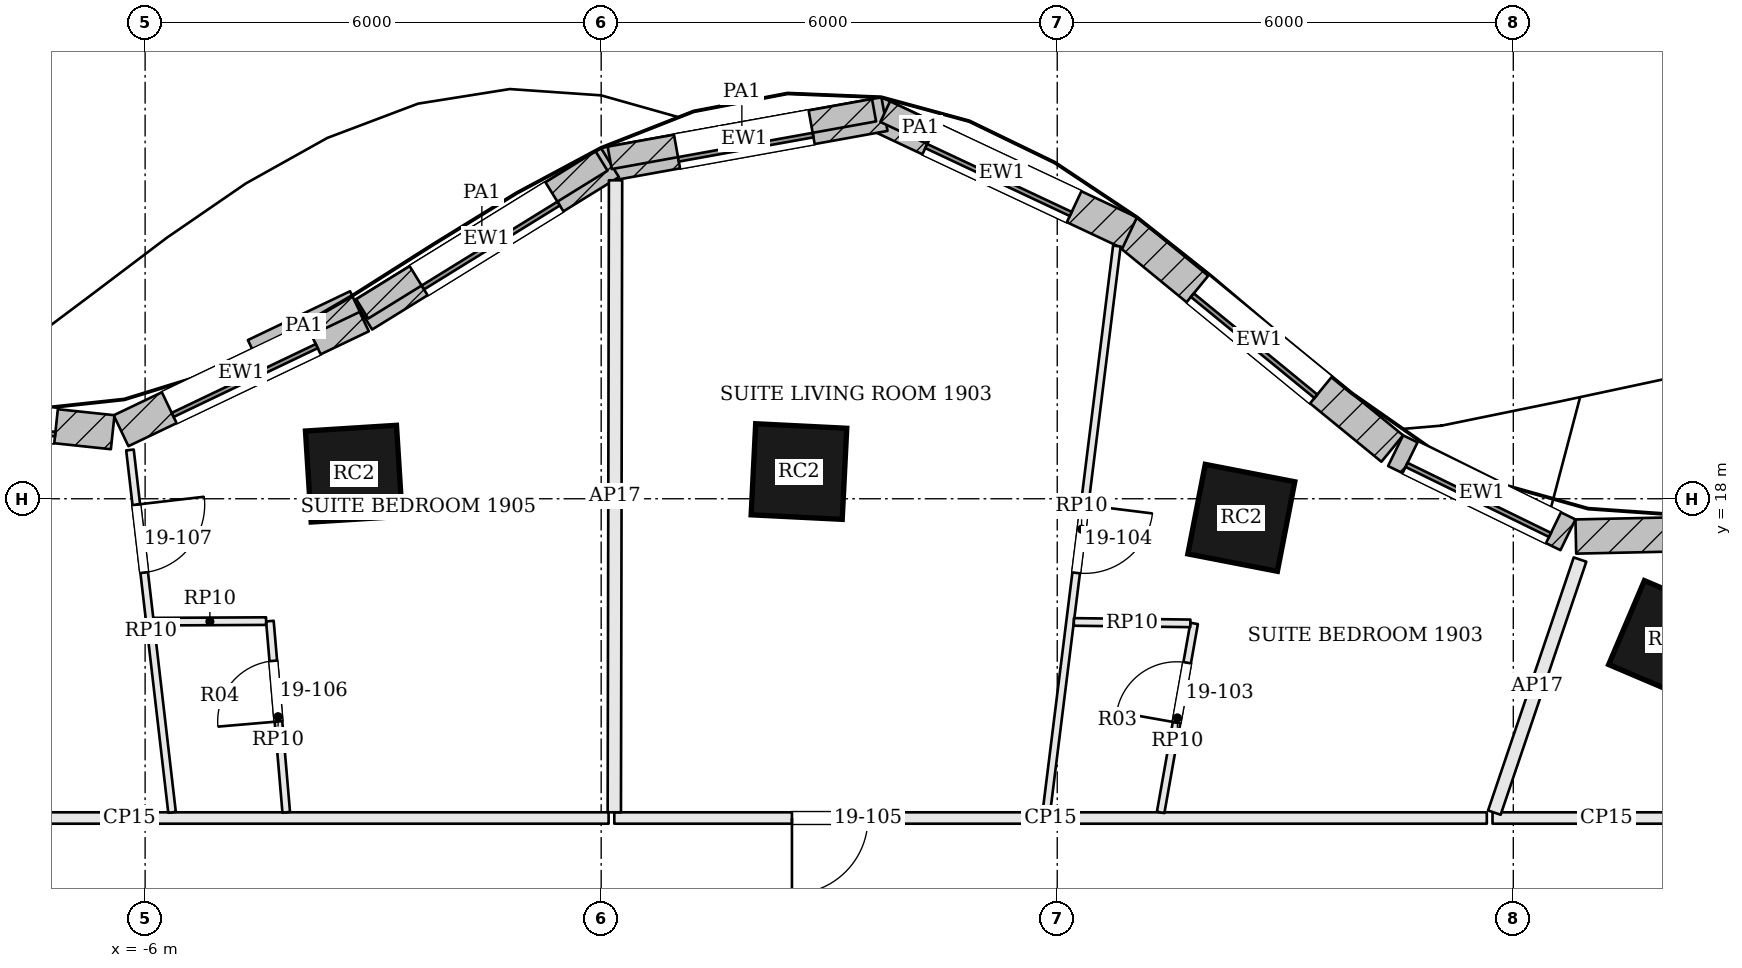
"""IFC4 building model, lengths in metres.
Left out: names, types, materials, properties, quantities, classifications, styles, units other than length and angle.
Written with IfcOpenShell. Run it as: python <this file> out.ifc"""

import sys

from ifc_helpers import new_model, si_unit, direction, frame, frame_2d, origin, origin_2d, place, context, subcontext, project, spatial, rectangle, extrude, element, fill, save


model = new_model("IFC4")
c1 = context("Model", 3, precision=1e-05, world=origin(), true_north=direction((0.0, 1.0)))
c2 = subcontext(c1, "Body", "Model", "MODEL_VIEW")
j1 = project(units=[si_unit("LENGTHUNIT", "METRE"), si_unit("PLANEANGLEUNIT", "RADIAN")], contexts=[c1])
p1 = place(None, origin())
s1 = spatial("IfcSite", under=j1, at=p1, CompositionType="ELEMENT")
p2 = place(p1, origin())
s2 = spatial("IfcBuilding", under=s1, at=p2, CompositionType="ELEMENT")
p3 = place(p2, frame((0.0, 0.0, 85.2)))
s3 = spatial("IfcBuildingStorey", under=s2, at=p3, CompositionType="ELEMENT", Elevation=85.2)
for number, where, z_axis, x_axis in (
    (1, (14.042, 16.136, 0.0), (0.0, 0.0, 1.0), (-0.92, 0.392, 0.0)),
    (2, (8.422, 17.749, 0.0), (0.0, 0.0, 1.0), (-0.982, 0.191, 0.0)),
    (3, (2.602, 18.358, 0.0), (0.0, 0.0, 1.0), (-0.999, 0.05, 0.0)),
    (4, (-3.254, 18.33, 0.0), (0.0, 0.0, 1.0), (-0.998, -0.063, 0.0)),
):
    element("IfcColumn", number, at=place(p3, frame(where, z_axis=z_axis, x_axis=x_axis)), inside=s3, PredefinedType="COLUMN", context=c2, shape_type="SweptSolid", body=[
        extrude(rectangle(XDim=1.2, YDim=1.2, at=origin_2d()), origin(), (0.0, 0.0, 1.0), 3.6),
    ])
p4 = place(p3, frame((18.434, 17.622, 0.0), z_axis=(0.0, 0.0, 1.0), x_axis=(-0.999773749739, -0.021270856405, 0.0)))
e5 = element("IfcWall", 5, at=p4, inside=s3, PredefinedType="SOLIDWALL", context=c2, shape_type="SweptSolid", body=[
    extrude(rectangle(XDim=5.613, YDim=0.45, at=frame_2d((2.806, 0.0))), origin(), (0.0, 0.0, 1.0), 3.4),
])
p5 = place(p4, frame((1.756, 0.0, 0.9)))
e6 = element("IfcOpeningElement", 6, at=p5, cuts=e5, PredefinedType="OPENING", context=c2, shape_type="SweptSolid", body=[
    extrude(rectangle(XDim=2.1, YDim=2.0, at=frame_2d((1.05, 1.0))), frame((0.0, 0.235, 0.0), z_axis=(0.0, -1.0, 0.0), x_axis=(1.0, 0.0, 0.0)), (0.0, 0.0, 1.0), 0.47),
])
p6 = place(p3, frame((12.719, 17.526, 0.0), z_axis=(0.0, 0.0, 1.0), x_axis=(-0.898643806462, 0.438679050226, 0.0)))
e7 = element("IfcWall", 7, at=p6, inside=s3, PredefinedType="SOLIDWALL", context=c2, shape_type="SweptSolid", body=[
    extrude(rectangle(XDim=2.523, YDim=0.45, at=frame_2d((1.262, 0.0))), origin(), (0.0, 0.0, 1.0), 3.4),
])
p7 = place(p6, frame((0.212, 0.0, 0.9)))
e8 = element("IfcOpeningElement", 8, at=p7, cuts=e7, PredefinedType="OPENING", context=c2, shape_type="SweptSolid", body=[
    extrude(rectangle(XDim=2.1, YDim=2.0, at=frame_2d((1.05, 1.0))), frame((0.0, 0.235, 0.0), z_axis=(0.0, -1.0, 0.0), x_axis=(1.0, 0.0, 0.0)), (0.0, 0.0, 1.0), 0.47),
])
p8 = place(p3, frame((10.407, 18.661, 0.0), z_axis=(0.0, 0.0, 1.0), x_axis=(-0.773702458947, 0.633549133864, 0.0)))
e9 = element("IfcWall", 9, at=p8, inside=s3, PredefinedType="SOLIDWALL", context=c2, shape_type="SweptSolid", body=[
    extrude(rectangle(XDim=4.526, YDim=0.45, at=frame_2d((2.263, 0.0))), origin(), (0.0, 0.0, 1.0), 3.4),
])
p9 = place(p8, frame((1.213, 0.0, 0.9)))
e10 = element("IfcOpeningElement", 10, at=p9, cuts=e9, PredefinedType="OPENING", context=c2, shape_type="SweptSolid", body=[
    extrude(rectangle(XDim=2.1, YDim=2.0, at=frame_2d((1.05, 1.0))), frame((0.0, 0.235, 0.0), z_axis=(0.0, -1.0, 0.0), x_axis=(1.0, 0.0, 0.0)), (0.0, 0.0, 1.0), 0.47),
])
p10 = place(p3, frame((6.953, 21.499, 0.0), z_axis=(0.0, 0.0, 1.0), x_axis=(-0.905034581957, 0.425337989676, 0.0)))
e11 = element("IfcWall", 11, at=p10, inside=s3, PredefinedType="SOLIDWALL", context=c2, shape_type="SweptSolid", body=[
    extrude(rectangle(XDim=3.714, YDim=0.45, at=frame_2d((1.857, 0.0))), origin(), (0.0, 0.0, 1.0), 3.4),
])
p11 = place(p10, frame((0.807, 0.0, 0.9)))
e12 = element("IfcOpeningElement", 12, at=p11, cuts=e11, PredefinedType="OPENING", context=c2, shape_type="SweptSolid", body=[
    extrude(rectangle(XDim=2.1, YDim=2.0, at=frame_2d((1.05, 1.0))), frame((0.0, 0.235, 0.0), z_axis=(0.0, -1.0, 0.0), x_axis=(1.0, 0.0, 0.0)), (0.0, 0.0, 1.0), 0.47),
])
p12 = place(p3, frame((3.727, 23.061, 0.0), z_axis=(0.0, 0.0, 1.0), x_axis=(-0.984119180424, -0.177508982087, 0.0)))
e13 = element("IfcWall", 13, at=p12, inside=s3, PredefinedType="SOLIDWALL", context=c2, shape_type="SweptSolid", body=[
    extrude(rectangle(XDim=3.747, YDim=0.45, at=frame_2d((1.873, 0.0))), origin(), (0.0, 0.0, 1.0), 3.4),
])
p13 = place(p12, frame((0.973, 0.0, 0.9)))
e14 = element("IfcOpeningElement", 14, at=p13, cuts=e13, PredefinedType="OPENING", context=c2, shape_type="SweptSolid", body=[
    extrude(rectangle(XDim=1.8, YDim=2.0, at=frame_2d((0.9, 1.0))), frame((0.0, 0.235, 0.0), z_axis=(0.0, -1.0, 0.0), x_axis=(1.0, 0.0, 0.0)), (0.0, 0.0, 1.0), 0.47),
])
p14 = place(p3, frame((0.115, 22.424, 0.0), z_axis=(0.0, 0.0, 1.0), x_axis=(-0.8506970368, -0.525656305564, 0.0)))
e15 = element("IfcWall", 15, at=p14, inside=s3, PredefinedType="SOLIDWALL", context=c2, shape_type="SweptSolid", body=[
    extrude(rectangle(XDim=3.816, YDim=0.45, at=frame_2d((1.908, 0.0))), origin(), (0.0, 0.0, 1.0), 3.4),
])
p15 = place(p14, frame((0.858, 0.0, 0.9)))
e16 = element("IfcOpeningElement", 16, at=p15, cuts=e15, PredefinedType="OPENING", context=c2, shape_type="SweptSolid", body=[
    extrude(rectangle(XDim=2.1, YDim=2.0, at=frame_2d((1.05, 1.0))), frame((0.0, 0.235, 0.0), z_axis=(0.0, -1.0, 0.0), x_axis=(1.0, 0.0, 0.0)), (0.0, 0.0, 1.0), 0.47),
])
p16 = place(p3, frame((-3.154, 20.406, 0.0), z_axis=(0.0, 0.0, 1.0), x_axis=(-0.902333313, -0.431038968367, 0.0)))
e17 = element("IfcWall", 17, at=p16, inside=s3, PredefinedType="SOLIDWALL", context=c2, shape_type="SweptSolid", body=[
    extrude(rectangle(XDim=3.505, YDim=0.45, at=frame_2d((1.753, 0.0))), origin(), (0.0, 0.0, 1.0), 3.4),
])
p17 = place(p16, frame((0.703, 0.0, 0.9)))
e18 = element("IfcOpeningElement", 18, at=p17, cuts=e17, PredefinedType="OPENING", context=c2, shape_type="SweptSolid", body=[
    extrude(rectangle(XDim=2.1, YDim=2.0, at=frame_2d((1.05, 1.0))), frame((0.0, 0.235, 0.0), z_axis=(0.0, -1.0, 0.0), x_axis=(1.0, 0.0, 0.0)), (0.0, 0.0, 1.0), 0.47),
])
p18 = place(p3, frame((-6.427, 18.875, 0.0), z_axis=(0.0, 0.0, 1.0), x_axis=(-0.994433468803, 0.10536638992, 0.0)))
e19 = element("IfcWall", 19, at=p18, inside=s3, PredefinedType="SOLIDWALL", context=c2, shape_type="SweptSolid", body=[
    extrude(rectangle(XDim=3.598, YDim=0.45, at=frame_2d((1.799, 0.0))), origin(), (0.0, 0.0, 1.0), 3.4),
])
p19 = place(p18, frame((0.749, 0.0, 0.9)))
e20 = element("IfcOpeningElement", 20, at=p19, cuts=e19, PredefinedType="OPENING", context=c2, shape_type="SweptSolid", body=[
    extrude(rectangle(XDim=2.1, YDim=2.0, at=frame_2d((1.05, 1.0))), frame((0.0, 0.235, 0.0), z_axis=(0.0, -1.0, 0.0), x_axis=(1.0, 0.0, 0.0)), (0.0, 0.0, 1.0), 0.47),
])
p20 = place(p3, frame((4.667, 22.656, 3.6), z_axis=(0.0, 0.0, 1.0), x_axis=(-0.905050240273, 0.425304670304, 0.0)))
e21 = element("IfcWall", 21, at=p20, inside=s3, PredefinedType="PARAPET", context=c2, shape_type="SweptSolid", body=[
    extrude(rectangle(XDim=1.027, YDim=0.3, at=frame_2d((0.513, 0.0))), origin(), (0.0, 0.0, 1.0), 1.1),
])
p21 = place(p3, frame((3.59, 23.112, 3.6), z_axis=(0.0, 0.0, 1.0), x_axis=(-0.984124248147, -0.177480884064, 0.0)))
e22 = element("IfcWall", 22, at=p21, inside=s3, PredefinedType="PARAPET", context=c2, shape_type="SweptSolid", body=[
    extrude(rectangle(XDim=3.534, YDim=0.3, at=frame_2d((1.767, 0.0))), origin(), (0.0, 0.0, 1.0), 1.1),
])
p22 = place(p3, frame((0.005, 22.444, 3.6), z_axis=(0.0, 0.0, 1.0), x_axis=(-0.850710394144, -0.525634688063, 0.0)))
e23 = element("IfcWall", 23, at=p22, inside=s3, PredefinedType="PARAPET", context=c2, shape_type="SweptSolid", body=[
    extrude(rectangle(XDim=3.702, YDim=0.3, at=frame_2d((1.851, 0.0))), origin(), (0.0, 0.0, 1.0), 1.1),
])
p23 = place(p3, frame((-3.239, 20.594, 3.6), z_axis=(0.0, 0.0, 1.0), x_axis=(-0.902344893923, -0.431014724123, 0.0)))
e24 = element("IfcWall", 24, at=p23, inside=s3, PredefinedType="PARAPET", context=c2, shape_type="SweptSolid", body=[
    extrude(rectangle(XDim=1.49, YDim=0.3, at=frame_2d((0.745, 0.0))), origin(), (0.0, 0.0, 1.0), 1.1),
])
p24 = place(p3, frame((14.725, 13.8, 0.0), z_axis=(0.0, 0.0, 1.0), x_axis=(-1.0, 0.0, 0.0)))
e25 = element("IfcWall", 25, at=p24, inside=s3, PredefinedType="PARTITIONING", context=c2, shape_type="SweptSolid", body=[
    extrude(rectangle(XDim=2.998, YDim=0.15, at=frame_2d((1.499, 0.0))), origin(), (0.0, 0.0, 1.0), 2.784),
])
p25 = place(p3, frame((12.878, 17.2, 0.0), z_axis=(0.0, 0.0, 1.0), x_axis=(-0.320642197559, -0.947200391229, 0.0)))
e26 = element("IfcWall", 26, at=p25, inside=s3, PredefinedType="PARTITIONING", context=c2, shape_type="SweptSolid", body=[
    extrude(rectangle(XDim=3.515, YDim=0.175, at=frame_2d((1.757, 0.0))), origin(), (0.0, 0.0, 1.0), 2.784),
])
p26 = place(p3, frame((11.652, 13.8, 0.0), z_axis=(0.0, 0.0, 1.0), x_axis=(-1.0, 0.0, 0.0)))
e27 = element("IfcWall", 27, at=p26, inside=s3, PredefinedType="PARTITIONING", context=c2, shape_type="SweptSolid", body=[
    extrude(rectangle(XDim=11.479, YDim=0.15, at=frame_2d((5.74, 0.0))), origin(), (0.0, 0.0, 1.0), 2.784),
])
p27 = place(p26, frame((8.142, 0.0, 0.0)))
e28 = element("IfcOpeningElement", 28, at=p27, cuts=e27, PredefinedType="OPENING", context=c2, shape_type="SweptSolid", body=[
    extrude(rectangle(XDim=1.0, YDim=2.1, at=frame_2d((0.5, 1.05))), frame((0.0, 0.085, 0.0), z_axis=(0.0, -1.0, 0.0), x_axis=(1.0, 0.0, 0.0)), (0.0, 0.0, 1.0), 0.17),
])
p28 = place(p3, frame((0.189, 22.19, 0.0), z_axis=(0.0, 0.0, 1.0), x_axis=(-0.001967286324, -0.99999806489, 0.0)))
e29 = element("IfcWall", 29, at=p28, inside=s3, PredefinedType="PARTITIONING", context=c2, shape_type="SweptSolid", body=[
    extrude(rectangle(XDim=8.315, YDim=0.175, at=frame_2d((4.157, 0.0))), origin(), (0.0, 0.0, 1.0), 2.784),
])
p29 = place(p3, frame((0.098, 13.8, 0.0), z_axis=(0.0, 0.0, 1.0), x_axis=(-1.0, 0.0, 0.0)))
e30 = element("IfcWall", 30, at=p29, inside=s3, PredefinedType="PARTITIONING", context=c2, shape_type="SweptSolid", body=[
    extrude(rectangle(XDim=12.609, YDim=0.15, at=frame_2d((6.304, 0.0))), origin(), (0.0, 0.0, 1.0), 2.784),
])
p30 = place(p29, frame((8.672, 0.0, 0.0)))
e31 = element("IfcOpeningElement", 31, at=p30, cuts=e30, PredefinedType="OPENING", context=c2, shape_type="SweptSolid", body=[
    extrude(rectangle(XDim=1.0, YDim=2.1, at=frame_2d((0.5, 1.05))), frame((0.0, 0.085, 0.0), z_axis=(0.0, -1.0, 0.0), x_axis=(1.0, 0.0, 0.0)), (0.0, 0.0, 1.0), 0.17),
])
p31 = place(p3, frame((6.784, 21.325, 0.0), z_axis=(0.0, 0.0, 1.0), x_axis=(-0.123570456303, -0.992335801193, 0.0)))
e32 = element("IfcWall", 32, at=p31, inside=s3, PredefinedType="PARTITIONING", context=c2, shape_type="SweptSolid", body=[
    extrude(rectangle(XDim=7.508, YDim=0.1, at=frame_2d((3.754, 0.0))), origin(), (0.0, 0.0, 1.0), 2.784),
])
p32 = place(p31, frame((3.433, 0.0, 0.0)))
e33 = element("IfcOpeningElement", 33, at=p32, cuts=e32, PredefinedType="OPENING", context=c2, shape_type="SweptSolid", body=[
    extrude(rectangle(XDim=0.9, YDim=2.4, at=frame_2d((0.45, 1.2))), frame((0.0, 0.06, 0.0), z_axis=(0.0, -1.0, 0.0), x_axis=(1.0, 0.0, 0.0)), (0.0, 0.0, 1.0), 0.12),
])
p33 = place(p3, frame((7.361, 13.874, 0.0), z_axis=(0.0, 0.0, 1.0), x_axis=(0.17451886907, 0.984653829698, 0.0)))
e34 = element("IfcWall", 34, at=p33, inside=s3, PredefinedType="PARTITIONING", context=c2, shape_type="SweptSolid", body=[
    extrude(rectangle(XDim=2.525, YDim=0.1, at=frame_2d((1.263, 0.0))), origin(), (0.0, 0.0, 1.0), 2.784),
])
p34 = place(p33, frame((1.2, 0.0, 0.0)))
e35 = element("IfcOpeningElement", 35, at=p34, cuts=e34, PredefinedType="OPENING", context=c2, shape_type="SweptSolid", body=[
    extrude(rectangle(XDim=0.8, YDim=2.1, at=frame_2d((0.4, 1.05))), frame((0.0, 0.06, 0.0), z_axis=(0.0, -1.0, 0.0), x_axis=(1.0, 0.0, 0.0)), (0.0, 0.0, 1.0), 0.12),
])
p35 = place(p3, frame((7.751, 16.361, 0.0), z_axis=(0.0, 0.0, 1.0), x_axis=(-0.999924768766, 0.01226608367, 0.0)))
e36 = element("IfcWall", 36, at=p35, inside=s3, PredefinedType="PARTITIONING", context=c2, shape_type="SweptSolid", body=[
    extrude(rectangle(XDim=1.532, YDim=0.1, at=frame_2d((0.766, 0.0))), origin(), (0.0, 0.0, 1.0), 2.784),
])
p36 = place(p3, frame((-6.199, 18.642, 0.0), z_axis=(0.0, 0.0, 1.0), x_axis=(0.115421487153, -0.993316606276, 0.0)))
e37 = element("IfcWall", 37, at=p36, inside=s3, PredefinedType="PARTITIONING", context=c2, shape_type="SweptSolid", body=[
    extrude(rectangle(XDim=4.799, YDim=0.1, at=frame_2d((2.4, 0.0))), origin(), (0.0, 0.0, 1.0), 2.784),
])
p37 = place(p36, frame((0.724, 0.0, 0.0)))
e38 = element("IfcOpeningElement", 38, at=p37, cuts=e37, PredefinedType="OPENING", context=c2, shape_type="SweptSolid", body=[
    extrude(rectangle(XDim=0.9, YDim=2.4, at=frame_2d((0.45, 1.2))), frame((0.0, 0.06, 0.0), z_axis=(0.0, -1.0, 0.0), x_axis=(1.0, 0.0, 0.0)), (0.0, 0.0, 1.0), 0.12),
])
p38 = place(p3, frame((-4.143, 13.875, 0.0), z_axis=(0.0, 0.0, 1.0), x_axis=(-0.085189957814, 0.996364727942, 0.0)))
e39 = element("IfcWall", 39, at=p38, inside=s3, PredefinedType="PARTITIONING", context=c2, shape_type="SweptSolid", body=[
    extrude(rectangle(XDim=2.525, YDim=0.1, at=frame_2d((1.262, 0.0))), origin(), (0.0, 0.0, 1.0), 2.784),
])
p39 = place(p38, frame((1.2, 0.0, 0.0)))
e40 = element("IfcOpeningElement", 40, at=p39, cuts=e39, PredefinedType="OPENING", context=c2, shape_type="SweptSolid", body=[
    extrude(rectangle(XDim=0.8, YDim=2.1, at=frame_2d((0.4, 1.05))), frame((0.0, 0.06, 0.0), z_axis=(0.0, -1.0, 0.0), x_axis=(1.0, 0.0, 0.0)), (0.0, 0.0, 1.0), 0.12),
])
p40 = place(p3, frame((-4.408, 16.39, 0.0), z_axis=(0.0, 0.0, 1.0), x_axis=(-0.999987730333, -0.00495370408, 0.0)))
e41 = element("IfcWall", 41, at=p40, inside=s3, PredefinedType="PARTITIONING", context=c2, shape_type="SweptSolid", body=[
    extrude(rectangle(XDim=1.479, YDim=0.1, at=frame_2d((0.739, 0.0))), origin(), (0.0, 0.0, 1.0), 2.784),
])
p41 = place(p7, origin())
e42 = element("IfcWindow", 42, at=p41, inside=s3, PartitioningType="SINGLE_PANEL", PredefinedType="WINDOW", context=c2, shape_type="SweptSolid", body=[
    extrude(rectangle(XDim=2.1, YDim=2.0, at=frame_2d((1.05, 1.0))), frame((0.0, 0.135, 0.0), z_axis=(0.0, -1.0, 0.0), x_axis=(1.0, 0.0, 0.0)), (0.0, 0.0, 1.0), 0.06),
])
fill(e8, e42)
p42 = place(p9, origin())
e43 = element("IfcWindow", 43, at=p42, inside=s3, PartitioningType="SINGLE_PANEL", PredefinedType="WINDOW", context=c2, shape_type="SweptSolid", body=[
    extrude(rectangle(XDim=2.1, YDim=2.0, at=frame_2d((1.05, 1.0))), frame((0.0, 0.135, 0.0), z_axis=(0.0, -1.0, 0.0), x_axis=(1.0, 0.0, 0.0)), (0.0, 0.0, 1.0), 0.06),
])
fill(e10, e43)
p43 = place(p11, origin())
e44 = element("IfcWindow", 44, at=p43, inside=s3, PartitioningType="SINGLE_PANEL", PredefinedType="WINDOW", context=c2, shape_type="SweptSolid", body=[
    extrude(rectangle(XDim=2.1, YDim=2.0, at=frame_2d((1.05, 1.0))), frame((0.0, 0.135, 0.0), z_axis=(0.0, -1.0, 0.0), x_axis=(1.0, 0.0, 0.0)), (0.0, 0.0, 1.0), 0.06),
])
fill(e12, e44)
p44 = place(p13, origin())
e45 = element("IfcWindow", 45, at=p44, inside=s3, PartitioningType="SINGLE_PANEL", PredefinedType="WINDOW", context=c2, shape_type="SweptSolid", body=[
    extrude(rectangle(XDim=1.8, YDim=2.0, at=frame_2d((0.9, 1.0))), frame((0.0, 0.135, 0.0), z_axis=(0.0, -1.0, 0.0), x_axis=(1.0, 0.0, 0.0)), (0.0, 0.0, 1.0), 0.06),
])
fill(e14, e45)
p45 = place(p15, origin())
e46 = element("IfcWindow", 46, at=p45, inside=s3, PartitioningType="SINGLE_PANEL", PredefinedType="WINDOW", context=c2, shape_type="SweptSolid", body=[
    extrude(rectangle(XDim=2.1, YDim=2.0, at=frame_2d((1.05, 1.0))), frame((0.0, 0.135, 0.0), z_axis=(0.0, -1.0, 0.0), x_axis=(1.0, 0.0, 0.0)), (0.0, 0.0, 1.0), 0.06),
])
fill(e16, e46)
p46 = place(p17, origin())
e47 = element("IfcWindow", 47, at=p46, inside=s3, PartitioningType="SINGLE_PANEL", PredefinedType="WINDOW", context=c2, shape_type="SweptSolid", body=[
    extrude(rectangle(XDim=2.1, YDim=2.0, at=frame_2d((1.05, 1.0))), frame((0.0, 0.135, 0.0), z_axis=(0.0, -1.0, 0.0), x_axis=(1.0, 0.0, 0.0)), (0.0, 0.0, 1.0), 0.06),
])
fill(e18, e47)
p47 = place(p19, origin())
e48 = element("IfcWindow", 48, at=p47, inside=s3, PartitioningType="SINGLE_PANEL", PredefinedType="WINDOW", context=c2, shape_type="SweptSolid", body=[
    extrude(rectangle(XDim=2.1, YDim=2.0, at=frame_2d((1.05, 1.0))), frame((0.0, 0.135, 0.0), z_axis=(0.0, -1.0, 0.0), x_axis=(1.0, 0.0, 0.0)), (0.0, 0.0, 1.0), 0.06),
])
fill(e20, e48)
p48 = place(p34, origin())
e49 = element("IfcDoor", 49, at=p48, inside=s3, OperationType="SINGLE_SWING_LEFT", PredefinedType="DOOR", context=c2, shape_type="SweptSolid", body=[
    extrude(rectangle(XDim=0.8, YDim=2.1, at=frame_2d((0.4, 1.05))), frame((0.0, 0.025, 0.0), z_axis=(0.0, -1.0, 0.0), x_axis=(1.0, 0.0, 0.0)), (0.0, 0.0, 1.0), 0.05),
])
fill(e35, e49)
p49 = place(p32, origin())
e50 = element("IfcDoor", 50, at=p49, inside=s3, OperationType="SINGLE_SWING_LEFT", PredefinedType="DOOR", context=c2, shape_type="SweptSolid", body=[
    extrude(rectangle(XDim=0.9, YDim=2.4, at=frame_2d((0.45, 1.2))), frame((0.0, 0.025, 0.0), z_axis=(0.0, -1.0, 0.0), x_axis=(1.0, 0.0, 0.0)), (0.0, 0.0, 1.0), 0.05),
])
fill(e33, e50)
p50 = place(p27, origin())
e51 = element("IfcDoor", 51, at=p50, inside=s3, OperationType="SINGLE_SWING_RIGHT", PredefinedType="DOOR", context=c2, shape_type="SweptSolid", body=[
    extrude(rectangle(XDim=1.0, YDim=2.1, at=frame_2d((0.5, 1.05))), frame((0.0, 0.025, 0.0), z_axis=(0.0, -1.0, 0.0), x_axis=(1.0, 0.0, 0.0)), (0.0, 0.0, 1.0), 0.05),
])
fill(e28, e51)
p51 = place(p39, origin())
e52 = element("IfcDoor", 52, at=p51, inside=s3, OperationType="SINGLE_SWING_LEFT", PredefinedType="DOOR", context=c2, shape_type="SweptSolid", body=[
    extrude(rectangle(XDim=0.8, YDim=2.1, at=frame_2d((0.4, 1.05))), frame((0.0, 0.025, 0.0), z_axis=(0.0, -1.0, 0.0), x_axis=(1.0, 0.0, 0.0)), (0.0, 0.0, 1.0), 0.05),
])
fill(e40, e52)
p52 = place(p37, origin())
e53 = element("IfcDoor", 53, at=p52, inside=s3, OperationType="SINGLE_SWING_LEFT", PredefinedType="DOOR", context=c2, shape_type="SweptSolid", body=[
    extrude(rectangle(XDim=0.9, YDim=2.4, at=frame_2d((0.45, 1.2))), frame((0.0, 0.025, 0.0), z_axis=(0.0, -1.0, 0.0), x_axis=(1.0, 0.0, 0.0)), (0.0, 0.0, 1.0), 0.05),
])
fill(e38, e53)
save(model, sys.argv[1])
